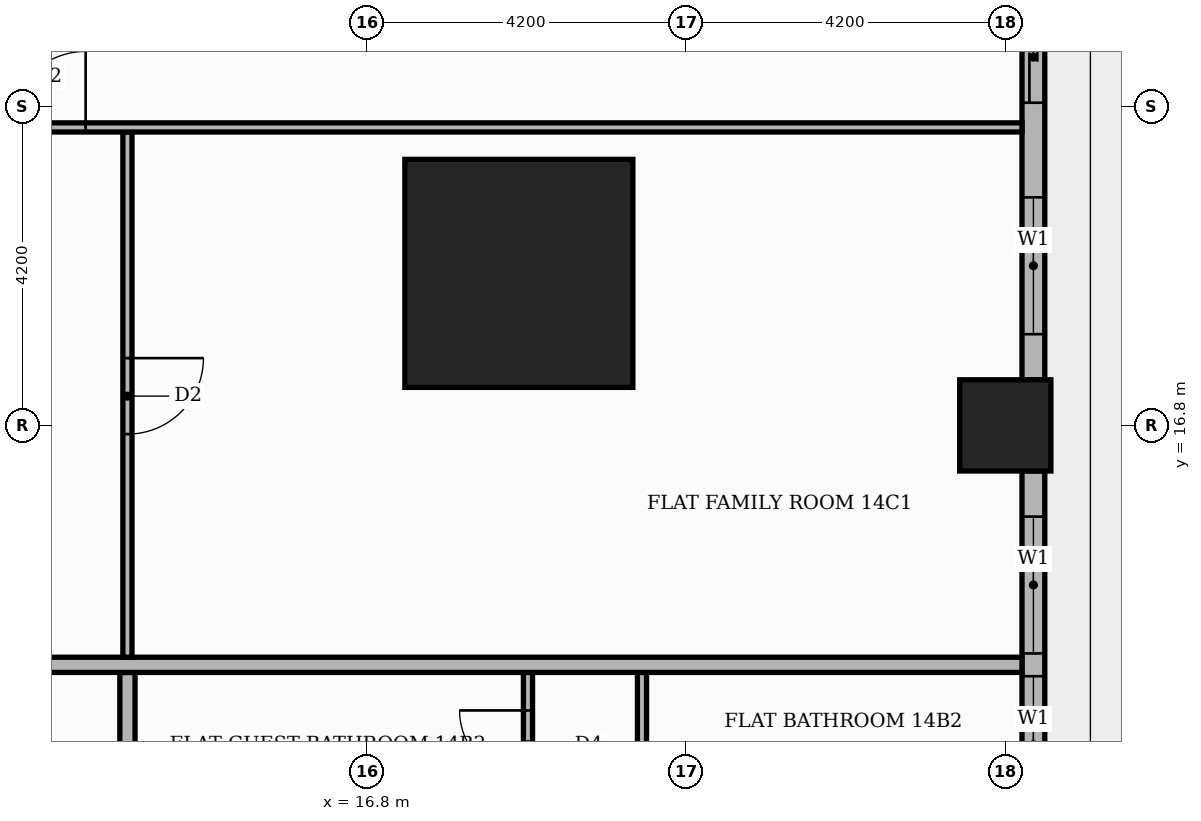
"""IFC4 building model, lengths in metres.
Left out: names, types, materials, properties, quantities, classifications, styles, units other than length and angle.
Written with IfcOpenShell. Run it as: python <this file> out.ifc"""

import sys

from ifc_helpers import new_model, si_unit, direction, frame, frame_2d, origin, origin_2d, place, context, subcontext, project, spatial, rectangle, extrude, element, fill, save


model = new_model("IFC4")
c1 = context("Model", 3, precision=1e-05, world=origin(), true_north=direction((0.0, 1.0)))
c2 = subcontext(c1, "Body", "Model", "MODEL_VIEW")
j1 = project(units=[si_unit("LENGTHUNIT", "METRE"), si_unit("PLANEANGLEUNIT", "RADIAN")], contexts=[c1])
p1 = place(None, origin())
s1 = spatial("IfcSite", under=j1, at=p1, CompositionType="ELEMENT")
p2 = place(p1, origin())
s2 = spatial("IfcBuilding", under=s1, at=p2, CompositionType="ELEMENT")
p3 = place(p2, frame((0.0, 0.0, 62.1)))
s3 = spatial("IfcBuildingStorey", under=s2, at=p3, CompositionType="ELEMENT", Elevation=62.1)
p4 = place(p3, frame((18.8, 18.8, 0.0), z_axis=(0.0, 0.0, 1.0), x_axis=(1.0, 0.0, 0.0)))
e1 = element("IfcColumn", 1, at=p4, inside=s3, PredefinedType="COLUMN", context=c2, shape_type="SweptSolid", body=[
    extrude(rectangle(XDim=3.0, YDim=3.0, at=origin_2d()), origin(), (0.0, 0.0, 1.0), 3.9),
])
p5 = place(p3, frame((25.2, 16.8, 0.0), z_axis=(0.0, 0.0, 1.0), x_axis=(1.0, 0.0, 0.0)))
e2 = element("IfcColumn", 2, at=p5, inside=s3, PredefinedType="COLUMN", context=c2, shape_type="SweptSolid", body=[
    extrude(rectangle(XDim=1.2, YDim=1.2, at=origin_2d()), origin(), (0.0, 0.0, 1.0), 3.9),
])
p6 = place(p3, frame((25.57, 9.0, 0.0), z_axis=(0.0, 0.0, 1.0), x_axis=(0.0, 1.0, 0.0)))
e3 = element("IfcWall", 3, at=p6, inside=s3, PredefinedType="STANDARD", context=c2, shape_type="SweptSolid", body=[
    extrude(rectangle(XDim=7.2, YDim=0.3, at=frame_2d((3.6, 0.0))), origin(), (0.0, 0.0, 1.0), 3.48),
])
p7 = place(p6, frame((0.6, 0.0, 0.9)))
e4 = element("IfcOpeningElement", 4, at=p7, cuts=e3, PredefinedType="OPENING", context=c2, shape_type="SweptSolid", body=[
    extrude(rectangle(XDim=1.8, YDim=2.1, at=frame_2d((0.9, 1.05))), frame((0.0, 0.16, 0.0), z_axis=(0.0, -1.0, 0.0), x_axis=(1.0, 0.0, 0.0)), (0.0, 0.0, 1.0), 0.32),
])
p8 = place(p6, frame((2.7, 0.0, 0.9)))
e5 = element("IfcOpeningElement", 5, at=p8, cuts=e3, PredefinedType="OPENING", context=c2, shape_type="SweptSolid", body=[
    extrude(rectangle(XDim=1.8, YDim=2.1, at=frame_2d((0.9, 1.05))), frame((0.0, 0.16, 0.0), z_axis=(0.0, -1.0, 0.0), x_axis=(1.0, 0.0, 0.0)), (0.0, 0.0, 1.0), 0.32),
])
p9 = place(p6, frame((4.8, 0.0, 0.9)))
e6 = element("IfcOpeningElement", 6, at=p9, cuts=e3, PredefinedType="OPENING", context=c2, shape_type="SweptSolid", body=[
    extrude(rectangle(XDim=1.8, YDim=2.1, at=frame_2d((0.9, 1.05))), frame((0.0, 0.16, 0.0), z_axis=(0.0, -1.0, 0.0), x_axis=(1.0, 0.0, 0.0)), (0.0, 0.0, 1.0), 0.32),
])
p10 = place(p3, frame((25.57, 17.4, 0.0), z_axis=(0.0, 0.0, 1.0), x_axis=(0.0, 1.0, 0.0)))
e7 = element("IfcWall", 7, at=p10, inside=s3, PredefinedType="STANDARD", context=c2, shape_type="SweptSolid", body=[
    extrude(rectangle(XDim=5.32, YDim=0.3, at=frame_2d((2.66, 0.0))), origin(), (0.0, 0.0, 1.0), 3.48),
])
p11 = place(p10, frame((0.6, 0.0, 0.9)))
e8 = element("IfcOpeningElement", 8, at=p11, cuts=e7, PredefinedType="OPENING", context=c2, shape_type="SweptSolid", body=[
    extrude(rectangle(XDim=1.8, YDim=2.1, at=frame_2d((0.9, 1.05))), frame((0.0, 0.16, 0.0), z_axis=(0.0, -1.0, 0.0), x_axis=(1.0, 0.0, 0.0)), (0.0, 0.0, 1.0), 0.32),
])
p12 = place(p10, frame((3.645, 0.0, 0.0)))
e9 = element("IfcOpeningElement", 9, at=p12, cuts=e7, PredefinedType="OPENING", context=c2, shape_type="SweptSolid", body=[
    extrude(rectangle(XDim=1.2, YDim=2.4, at=frame_2d((0.6, 1.2))), frame((0.0, 0.16, 0.0), z_axis=(0.0, -1.0, 0.0), x_axis=(1.0, 0.0, 0.0)), (0.0, 0.0, 1.0), 0.32),
])
p13 = place(p3, frame((13.65, -5.15, 0.0), z_axis=(0.0, 0.0, 1.0), x_axis=(0.0, 1.0, 0.0)))
e10 = element("IfcWall", 10, at=p13, inside=s3, PredefinedType="PARTITIONING", context=c2, shape_type="SweptSolid", body=[
    extrude(rectangle(XDim=18.7, YDim=0.2, at=frame_2d((9.35, 0.0))), origin(), (0.0, 0.0, 1.0), 3.48),
])
p14 = place(p13, frame((5.65, 0.0, 0.0)))
e11 = element("IfcOpeningElement", 11, at=p14, cuts=e10, PredefinedType="OPENING", context=c2, shape_type="SweptSolid", body=[
    extrude(rectangle(XDim=1.1, YDim=2.4, at=frame_2d((0.55, 1.2))), frame((0.0, 0.11, 0.0), z_axis=(0.0, -1.0, 0.0), x_axis=(1.0, 0.0, 0.0)), (0.0, 0.0, 1.0), 0.22),
])
p15 = place(p3, frame((18.92, 11.61, 0.0), z_axis=(0.0, 0.0, 1.0), x_axis=(0.0, 1.0, 0.0)))
e12 = element("IfcWall", 12, at=p15, inside=s3, PredefinedType="PARTITIONING", context=c2, shape_type="SweptSolid", body=[
    extrude(rectangle(XDim=1.94, YDim=0.12, at=frame_2d((0.97, 0.0))), origin(), (0.0, 0.0, 1.0), 3.48),
])
p16 = place(p15, frame((0.54, 0.0, 0.0)))
e13 = element("IfcOpeningElement", 13, at=p16, cuts=e12, PredefinedType="OPENING", context=c2, shape_type="SweptSolid", body=[
    extrude(rectangle(XDim=0.9, YDim=2.1, at=frame_2d((0.45, 1.05))), frame((0.0, 0.07, 0.0), z_axis=(0.0, -1.0, 0.0), x_axis=(1.0, 0.0, 0.0)), (0.0, 0.0, 1.0), 0.14),
])
p17 = place(p3, frame((20.42, 11.61, 0.0), z_axis=(0.0, 0.0, 1.0), x_axis=(0.0, 1.0, 0.0)))
e14 = element("IfcWall", 14, at=p17, inside=s3, PredefinedType="PARTITIONING", context=c2, shape_type="SweptSolid", body=[
    extrude(rectangle(XDim=1.94, YDim=0.12, at=frame_2d((0.97, 0.0))), origin(), (0.0, 0.0, 1.0), 3.48),
])
p18 = place(p3, frame((-13.65, 13.65, 0.0), z_axis=(0.0, 0.0, 1.0), x_axis=(1.0, 0.0, 0.0)))
e15 = element("IfcWall", 15, at=p18, inside=s3, PredefinedType="PARTITIONING", context=c2, shape_type="SweptSolid", body=[
    extrude(rectangle(XDim=39.07, YDim=0.2, at=frame_2d((19.535, 0.0))), origin(), (0.0, 0.0, 1.0), 3.48),
])
p19 = place(p18, frame((23.6, 0.0, 0.0)))
e16 = element("IfcOpeningElement", 16, at=p19, cuts=e15, PredefinedType="OPENING", context=c2, shape_type="SweptSolid", body=[
    extrude(rectangle(XDim=1.1, YDim=2.4, at=frame_2d((0.55, 1.2))), frame((0.0, 0.11, 0.0), z_axis=(0.0, -1.0, 0.0), x_axis=(1.0, 0.0, 0.0)), (0.0, 0.0, 1.0), 0.22),
])
p20 = place(p3, frame((13.65, 13.75, 0.0), z_axis=(0.0, 0.0, 1.0), x_axis=(0.0, 1.0, 0.0)))
e17 = element("IfcWall", 17, at=p20, inside=s3, PredefinedType="PARTITIONING", context=c2, shape_type="SweptSolid", body=[
    extrude(rectangle(XDim=6.91, YDim=0.12, at=frame_2d((3.455, 0.0))), origin(), (0.0, 0.0, 1.0), 3.48),
])
p21 = place(p20, frame((2.935, 0.0, 0.0)))
e18 = element("IfcOpeningElement", 18, at=p21, cuts=e17, PredefinedType="OPENING", context=c2, shape_type="SweptSolid", body=[
    extrude(rectangle(XDim=1.0, YDim=2.1, at=frame_2d((0.5, 1.05))), frame((0.0, 0.07, 0.0), z_axis=(0.0, -1.0, 0.0), x_axis=(1.0, 0.0, 0.0)), (0.0, 0.0, 1.0), 0.14),
])
p22 = place(p3, frame((-13.55, 20.72, 0.0), z_axis=(0.0, 0.0, 1.0), x_axis=(1.0, 0.0, 0.0)))
e19 = element("IfcWall", 19, at=p22, inside=s3, PredefinedType="PARTITIONING", context=c2, shape_type="SweptSolid", body=[
    extrude(rectangle(XDim=38.97, YDim=0.12, at=frame_2d((19.485, 0.0))), origin(), (0.0, 0.0, 1.0), 3.48),
])
p23 = place(p22, frame((25.65, 0.0, 0.0)))
e20 = element("IfcOpeningElement", 20, at=p23, cuts=e19, PredefinedType="OPENING", context=c2, shape_type="SweptSolid", body=[
    extrude(rectangle(XDim=1.0, YDim=2.1, at=frame_2d((0.5, 1.05))), frame((0.0, 0.07, 0.0), z_axis=(0.0, -1.0, 0.0), x_axis=(1.0, 0.0, 0.0)), (0.0, 0.0, 1.0), 0.14),
])
p24 = place(p22, frame((20.45, 0.0, 0.0)))
e21 = element("IfcOpeningElement", 21, at=p24, cuts=e19, PredefinedType="OPENING", context=c2, shape_type="SweptSolid", body=[
    extrude(rectangle(XDim=0.9, YDim=2.1, at=frame_2d((0.45, 1.05))), frame((0.0, 0.07, 0.0), z_axis=(0.0, -1.0, 0.0), x_axis=(1.0, 0.0, 0.0)), (0.0, 0.0, 1.0), 0.14),
])
p25 = place(p22, frame((9.95, 0.0, 0.0)))
e22 = element("IfcOpeningElement", 22, at=p25, cuts=e19, PredefinedType="OPENING", context=c2, shape_type="SweptSolid", body=[
    extrude(rectangle(XDim=0.9, YDim=2.1, at=frame_2d((0.45, 1.05))), frame((0.0, 0.07, 0.0), z_axis=(0.0, -1.0, 0.0), x_axis=(1.0, 0.0, 0.0)), (0.0, 0.0, 1.0), 0.14),
])
p26 = place(p22, frame((2.6, 0.0, 0.0)))
e23 = element("IfcOpeningElement", 23, at=p26, cuts=e19, PredefinedType="OPENING", context=c2, shape_type="SweptSolid", body=[
    extrude(rectangle(XDim=0.9, YDim=2.1, at=frame_2d((0.45, 1.05))), frame((0.0, 0.07, 0.0), z_axis=(0.0, -1.0, 0.0), x_axis=(1.0, 0.0, 0.0)), (0.0, 0.0, 1.0), 0.14),
])
p27 = place(p8, origin())
e24 = element("IfcWindow", 24, at=p27, inside=s3, PartitioningType="SINGLE_PANEL", PredefinedType="WINDOW", context=c2, shape_type="SweptSolid", body=[
    extrude(rectangle(XDim=1.8, YDim=2.1, at=frame_2d((0.9, 1.05))), frame((0.0, 0.03, 0.0), z_axis=(0.0, -1.0, 0.0), x_axis=(1.0, 0.0, 0.0)), (0.0, 0.0, 1.0), 0.06),
])
fill(e5, e24)
p28 = place(p9, origin())
e25 = element("IfcWindow", 25, at=p28, inside=s3, PartitioningType="SINGLE_PANEL", PredefinedType="WINDOW", context=c2, shape_type="SweptSolid", body=[
    extrude(rectangle(XDim=1.8, YDim=2.1, at=frame_2d((0.9, 1.05))), frame((0.0, 0.03, 0.0), z_axis=(0.0, -1.0, 0.0), x_axis=(1.0, 0.0, 0.0)), (0.0, 0.0, 1.0), 0.06),
])
fill(e6, e25)
p29 = place(p11, origin())
e26 = element("IfcWindow", 26, at=p29, inside=s3, PartitioningType="SINGLE_PANEL", PredefinedType="WINDOW", context=c2, shape_type="SweptSolid", body=[
    extrude(rectangle(XDim=1.8, YDim=2.1, at=frame_2d((0.9, 1.05))), frame((0.0, 0.03, 0.0), z_axis=(0.0, -1.0, 0.0), x_axis=(1.0, 0.0, 0.0)), (0.0, 0.0, 1.0), 0.06),
])
fill(e8, e26)
p30 = place(p12, origin())
e27 = element("IfcDoor", 27, at=p30, inside=s3, OperationType="SLIDING_TO_RIGHT", PredefinedType="DOOR", context=c2, shape_type="SweptSolid", body=[
    extrude(rectangle(XDim=1.2, YDim=2.4, at=frame_2d((0.6, 1.2))), frame((0.0, 0.025, 0.0), z_axis=(0.0, -1.0, 0.0), x_axis=(1.0, 0.0, 0.0)), (0.0, 0.0, 1.0), 0.05),
])
fill(e9, e27)
p31 = place(p16, origin())
e28 = element("IfcDoor", 28, at=p31, inside=s3, OperationType="SINGLE_SWING_RIGHT", PredefinedType="DOOR", context=c2, shape_type="SweptSolid", body=[
    extrude(rectangle(XDim=0.9, YDim=2.1, at=frame_2d((0.45, 1.05))), frame((0.0, 0.025, 0.0), z_axis=(0.0, -1.0, 0.0), x_axis=(1.0, 0.0, 0.0)), (0.0, 0.0, 1.0), 0.05),
])
fill(e13, e28)
p32 = place(p21, frame((1.0, 0.0, 0.0), z_axis=(0.0, 0.0, 1.0), x_axis=(-1.0, 0.0, 0.0)))
e29 = element("IfcDoor", 29, at=p32, inside=s3, OperationType="SINGLE_SWING_RIGHT", PredefinedType="DOOR", context=c2, shape_type="SweptSolid", body=[
    extrude(rectangle(XDim=1.0, YDim=2.1, at=frame_2d((0.5, 1.05))), frame((0.0, 0.025, 0.0), z_axis=(0.0, -1.0, 0.0), x_axis=(1.0, 0.0, 0.0)), (0.0, 0.0, 1.0), 0.05),
])
fill(e18, e29)
p33 = place(p23, origin())
e30 = element("IfcDoor", 30, at=p33, inside=s3, OperationType="SINGLE_SWING_RIGHT", PredefinedType="DOOR", context=c2, shape_type="SweptSolid", body=[
    extrude(rectangle(XDim=1.0, YDim=2.1, at=frame_2d((0.5, 1.05))), frame((0.0, 0.025, 0.0), z_axis=(0.0, -1.0, 0.0), x_axis=(1.0, 0.0, 0.0)), (0.0, 0.0, 1.0), 0.05),
])
fill(e20, e30)
save(model, sys.argv[1])
